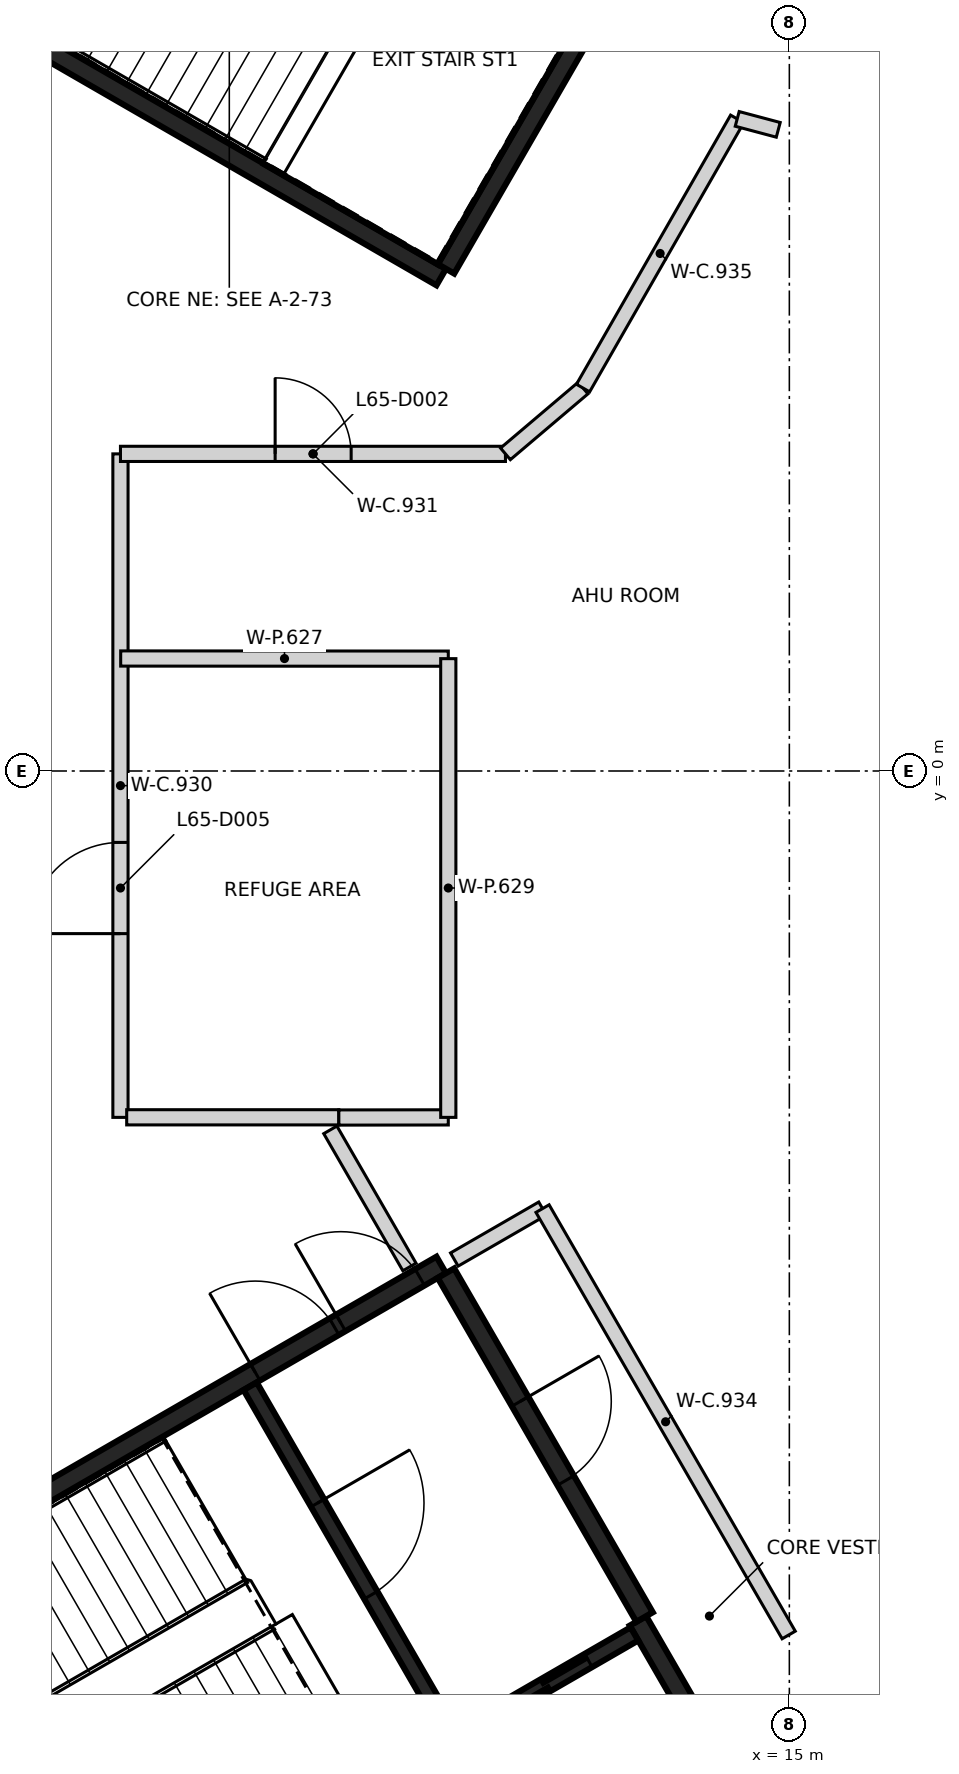
"""IFC4 building model, lengths in metres.
Left out: names, types, materials, properties, quantities, classifications, styles, units other than length and angle.
Written with IfcOpenShell. Run it as: python <this file> out.ifc"""

import sys

from ifc_helpers import new_model, si_unit, direction, frame, frame_2d, origin, place, context, subcontext, project, spatial, rectangle, extrude, element, fill, save


model = new_model("IFC4")
c1 = context("Model", 3, precision=1e-05, world=origin(), true_north=direction((0.0, 1.0)))
c2 = subcontext(c1, "Body", "Model", "MODEL_VIEW")
j1 = project(units=[si_unit("LENGTHUNIT", "METRE"), si_unit("PLANEANGLEUNIT", "RADIAN")], contexts=[c1])
p1 = place(None, origin())
s1 = spatial("IfcSite", under=j1, at=p1, CompositionType="ELEMENT")
p2 = place(p1, origin())
s2 = spatial("IfcBuilding", under=s1, at=p2, CompositionType="ELEMENT")
p3 = place(p2, frame((0.0, 0.0, 257.4)))
s3 = spatial("IfcBuildingStorey", under=s2, at=p3, CompositionType="ELEMENT", Elevation=257.4)
p4 = place(p3, frame((10.42, 6.498, 0.0), z_axis=(0.0, 0.0, 1.0), x_axis=(-0.866021906294, 0.500006057782, 0.0)))
e1 = element("IfcWall", 1, at=p4, inside=s3, PredefinedType="SHEAR", context=c2, shape_type="SweptSolid", body=[
    extrude(rectangle(XDim=11.55, YDim=0.25, at=frame_2d((5.775, 0.0))), origin(), (0.0, 0.0, 1.0), 4.45),
])
p5 = place(p4, frame((10.025, 0.0, 0.0)))
e2 = element("IfcOpeningElement", 2, at=p5, cuts=e1, PredefinedType="OPENING", context=c2, shape_type="SweptSolid", body=[
    extrude(rectangle(XDim=1.2, YDim=2.1, at=frame_2d((0.6, 1.05))), frame((0.0, 0.135, 0.0), z_axis=(0.0, -1.0, 0.0), x_axis=(1.0, 0.0, 0.0)), (0.0, 0.0, 1.0), 0.27),
])
p6 = place(p4, frame((8.725, 0.0, 0.0)))
e3 = element("IfcOpeningElement", 3, at=p6, cuts=e1, PredefinedType="OPENING", context=c2, shape_type="SweptSolid", body=[
    extrude(rectangle(XDim=1.2, YDim=2.1, at=frame_2d((0.6, 1.05))), frame((0.0, 0.135, 0.0), z_axis=(0.0, -1.0, 0.0), x_axis=(1.0, 0.0, 0.0)), (0.0, 0.0, 1.0), 0.27),
])
p7 = place(p3, frame((13.238, 11.378, 0.0), z_axis=(0.0, 0.0, 1.0), x_axis=(-0.500008851346, -0.866020293397, 0.0)))
e4 = element("IfcWall", 4, at=p7, inside=s3, PredefinedType="SHEAR", context=c2, shape_type="SweptSolid", body=[
    extrude(rectangle(XDim=5.51, YDim=0.25, at=frame_2d((2.755, 0.0))), origin(), (0.0, 0.0, 1.0), 4.45),
])
p8 = place(p3, frame((0.417, -12.273, 0.0), z_axis=(0.0, 0.0, 1.0), x_axis=(0.866021906294, 0.500006057782, 0.0)))
e5 = element("IfcWall", 5, at=p8, inside=s3, PredefinedType="SHEAR", context=c2, shape_type="SweptSolid", body=[
    extrude(rectangle(XDim=11.55, YDim=0.25, at=frame_2d((5.775, 0.0))), origin(), (0.0, 0.0, 1.0), 4.45),
])
p9 = place(p8, frame((10.025, 0.0, 0.0)))
e6 = element("IfcOpeningElement", 6, at=p9, cuts=e5, PredefinedType="OPENING", context=c2, shape_type="SweptSolid", body=[
    extrude(rectangle(XDim=1.2, YDim=2.1, at=frame_2d((0.6, 1.05))), frame((0.0, 0.135, 0.0), z_axis=(0.0, -1.0, 0.0), x_axis=(1.0, 0.0, 0.0)), (0.0, 0.0, 1.0), 0.27),
])
p10 = place(p8, frame((8.725, 0.0, 0.0)))
e7 = element("IfcOpeningElement", 7, at=p10, cuts=e5, PredefinedType="OPENING", context=c2, shape_type="SweptSolid", body=[
    extrude(rectangle(XDim=1.2, YDim=2.1, at=frame_2d((0.6, 1.05))), frame((0.0, 0.135, 0.0), z_axis=(0.0, -1.0, 0.0), x_axis=(1.0, 0.0, 0.0)), (0.0, 0.0, 1.0), 0.27),
])
p11 = place(p3, frame((13.008, -11.181, 0.0), z_axis=(0.0, 0.0, 1.0), x_axis=(0.500001955336, -0.866024274868, 0.0)))
e8 = element("IfcWall", 8, at=p11, inside=s3, PredefinedType="SHEAR", context=c2, shape_type="SweptSolid", body=[
    extrude(rectangle(XDim=6.125, YDim=0.25, at=frame_2d((3.062, 0.0))), origin(), (0.0, 0.0, 1.0), 4.45),
])
p12 = place(p11, frame((3.563, 0.0, 0.0)))
e9 = element("IfcOpeningElement", 9, at=p12, cuts=e8, PredefinedType="OPENING", context=c2, shape_type="SweptSolid", body=[
    extrude(rectangle(XDim=1.0, YDim=2.1, at=frame_2d((0.5, 1.05))), frame((0.0, 0.135, 0.0), z_axis=(0.0, -1.0, 0.0), x_axis=(1.0, 0.0, 0.0)), (0.0, 0.0, 1.0), 0.27),
])
p13 = place(p3, frame((10.483, -6.606, 0.0), z_axis=(0.0, 0.0, 1.0), x_axis=(0.49999885962, -0.866026062182, 0.0)))
e10 = element("IfcWall", 10, at=p13, inside=s3, PredefinedType="SHEAR", context=c2, shape_type="SweptSolid", body=[
    extrude(rectangle(XDim=5.225, YDim=0.25, at=frame_2d((2.612, 0.0))), origin(), (0.0, 0.0, 1.0), 4.45),
])
p14 = place(p13, frame((1.95, 0.0, 0.0)))
e11 = element("IfcOpeningElement", 11, at=p14, cuts=e10, PredefinedType="OPENING", context=c2, shape_type="SweptSolid", body=[
    extrude(rectangle(XDim=1.2, YDim=2.1, at=frame_2d((0.6, 1.05))), frame((0.0, 0.135, 0.0), z_axis=(0.0, -1.0, 0.0), x_axis=(1.0, 0.0, 0.0)), (0.0, 0.0, 1.0), 0.27),
])
p15 = place(p3, frame((7.906, -8.094, 0.0), z_axis=(0.0, 0.0, 1.0), x_axis=(0.500027839223, -0.866009330205, 0.0)))
e12 = element("IfcWall", 12, at=p15, inside=s3, PredefinedType="SHEAR", context=c2, shape_type="SweptSolid", body=[
    extrude(rectangle(XDim=5.098, YDim=0.2, at=frame_2d((2.549, 0.0))), origin(), (0.0, 0.0, 1.0), 4.45),
])
p16 = place(p15, frame((1.774, 0.0, 0.0)))
e13 = element("IfcOpeningElement", 13, at=p16, cuts=e12, PredefinedType="OPENING", context=c2, shape_type="SweptSolid", body=[
    extrude(rectangle(XDim=1.4, YDim=2.1, at=frame_2d((0.7, 1.05))), frame((0.0, 0.11, 0.0), z_axis=(0.0, -1.0, 0.0), x_axis=(1.0, 0.0, 0.0)), (0.0, 0.0, 1.0), 0.22),
])
p17 = place(p3, frame((10.666, -12.678, 0.0), z_axis=(0.0, 0.0, 1.0), x_axis=(0.866018407898, 0.500012117035, 0.0)))
e14 = element("IfcWall", 14, at=p17, inside=s3, PredefinedType="SHEAR", context=c2, shape_type="SweptSolid", body=[
    extrude(rectangle(XDim=2.651, YDim=0.2, at=frame_2d((1.325, 0.0))), origin(), (0.0, 0.0, 1.0), 4.45),
])
p18 = place(p17, frame((0.652, 0.0, 0.0)))
e15 = element("IfcOpeningElement", 15, at=p18, cuts=e14, PredefinedType="OPENING", context=c2, shape_type="SweptSolid", body=[
    extrude(rectangle(XDim=1.3, YDim=2.1, at=frame_2d((0.65, 1.05))), frame((0.0, 0.11, 0.0), z_axis=(0.0, -1.0, 0.0), x_axis=(1.0, 0.0, 0.0)), (0.0, 0.0, 1.0), 0.22),
])
p19 = place(p3, frame((6.2, -4.557, 0.0), z_axis=(0.0, 0.0, 1.0), x_axis=(0.0, 1.0, 0.0)))
e16 = element("IfcWall", 16, at=p19, inside=s3, PredefinedType="PARTITIONING", context=c2, shape_type="SweptSolid", body=[
    extrude(rectangle(XDim=8.729, YDim=0.2, at=frame_2d((4.365, 0.0))), origin(), (0.0, 0.0, 1.0), 4.45),
])
p20 = place(p19, frame((2.417, 0.0, 0.0)))
e17 = element("IfcOpeningElement", 17, at=p20, cuts=e16, PredefinedType="OPENING", context=c2, shape_type="SweptSolid", body=[
    extrude(rectangle(XDim=1.2, YDim=2.1, at=frame_2d((0.6, 1.05))), frame((0.0, 0.11, 0.0), z_axis=(0.0, -1.0, 0.0), x_axis=(1.0, 0.0, 0.0)), (0.0, 0.0, 1.0), 0.22),
])
p21 = place(p3, frame((6.2, 4.172, 0.0), z_axis=(0.0, 0.0, 1.0), x_axis=(1.0, 0.0, 0.0)))
e18 = element("IfcWall", 18, at=p21, inside=s3, PredefinedType="PARTITIONING", context=c2, shape_type="SweptSolid", body=[
    extrude(rectangle(XDim=5.065, YDim=0.2, at=frame_2d((2.532, 0.0))), origin(), (0.0, 0.0, 1.0), 4.45),
])
p22 = place(p21, frame((2.035, 0.0, 0.0)))
e19 = element("IfcOpeningElement", 19, at=p22, cuts=e18, PredefinedType="OPENING", context=c2, shape_type="SweptSolid", body=[
    extrude(rectangle(XDim=1.0, YDim=2.1, at=frame_2d((0.5, 1.05))), frame((0.0, 0.11, 0.0), z_axis=(0.0, -1.0, 0.0), x_axis=(1.0, 0.0, 0.0)), (0.0, 0.0, 1.0), 0.22),
])
p23 = place(p3, frame((6.282, -4.556, 0.0), z_axis=(0.0, 0.0, 1.0), x_axis=(1.0, 0.0, 0.0)))
e20 = element("IfcWall", 20, at=p23, inside=s3, PredefinedType="PARTITIONING", context=c2, shape_type="SweptSolid", body=[
    extrude(rectangle(XDim=2.791, YDim=0.2, at=frame_2d((1.396, 0.0))), origin(), (0.0, 0.0, 1.0), 4.45),
])
p24 = place(p3, frame((8.961, -4.721, 0.0), z_axis=(0.0, 0.0, 1.0), x_axis=(0.499806992981, -0.866136807766, 0.0)))
e21 = element("IfcWall", 21, at=p24, inside=s3, PredefinedType="PARTITIONING", context=c2, shape_type="SweptSolid", body=[
    extrude(rectangle(XDim=2.083, YDim=0.2, at=frame_2d((1.042, 0.0))), origin(), (0.0, 0.0, 1.0), 4.45),
])
p25 = place(p3, frame((10.593, -6.427, 0.0), z_axis=(0.0, 0.0, 1.0), x_axis=(0.865912429188, 0.500195626709, 0.0)))
e22 = element("IfcWall", 22, at=p25, inside=s3, PredefinedType="PARTITIONING", context=c2, shape_type="SweptSolid", body=[
    extrude(rectangle(XDim=1.34, YDim=0.2, at=frame_2d((0.67, 0.0))), origin(), (0.0, 0.0, 1.0), 4.45),
])
p26 = place(p3, frame((11.265, 4.172, 0.0), z_axis=(0.0, 0.0, 1.0), x_axis=(0.762631798807, 0.64683285279, 0.0)))
e23 = element("IfcWall", 23, at=p26, inside=s3, PredefinedType="PARTITIONING", context=c2, shape_type="SweptSolid", body=[
    extrude(rectangle(XDim=1.339, YDim=0.2, at=frame_2d((0.669, 0.0))), origin(), (0.0, 0.0, 1.0), 4.45),
])
p27 = place(p3, frame((11.753, -5.757, 0.0), z_axis=(0.0, 0.0, 1.0), x_axis=(0.499994352157, -0.866028664543, 0.0)))
e24 = element("IfcWall", 24, at=p27, inside=s3, PredefinedType="PARTITIONING", context=c2, shape_type="SweptSolid", body=[
    extrude(rectangle(XDim=6.477, YDim=0.2, at=frame_2d((3.239, 0.0))), origin(), (0.0, 0.0, 1.0), 4.45),
])
p28 = place(p3, frame((12.286, 5.038, 0.0), z_axis=(0.0, 0.0, 1.0), x_axis=(0.496995625394, 0.86775304571, 0.0)))
e25 = element("IfcWall", 25, at=p28, inside=s3, PredefinedType="PARTITIONING", context=c2, shape_type="SweptSolid", body=[
    extrude(rectangle(XDim=4.081, YDim=0.2, at=frame_2d((2.04, 0.0))), origin(), (0.0, 0.0, 1.0), 4.45),
])
p29 = place(p3, frame((14.314, 8.579, 0.0), z_axis=(0.0, 0.0, 1.0), x_axis=(0.966220438204, -0.257717024656, 0.0)))
e26 = element("IfcWall", 26, at=p29, inside=s3, PredefinedType="PARTITIONING", context=c2, shape_type="SweptSolid", body=[
    extrude(rectangle(XDim=0.559, YDim=0.2, at=frame_2d((0.279, 0.0))), origin(), (0.0, 0.0, 1.0), 4.45),
])
p30 = place(p3, frame((6.203, 1.48, 0.0), z_axis=(0.0, 0.0, 1.0), x_axis=(0.999999897325, -0.000453155046, 0.0)))
e27 = element("IfcWall", 27, at=p30, inside=s3, PredefinedType="PARTITIONING", context=c2, shape_type="SweptSolid", body=[
    extrude(rectangle(XDim=4.31, YDim=0.2, at=frame_2d((2.155, 0.0))), origin(), (0.0, 0.0, 1.0), 4.45),
])
p31 = place(p3, frame((9.073, -4.559, 0.0), z_axis=(0.0, 0.0, 1.0), x_axis=(0.999999080102, 0.00135639075, 0.0)))
e28 = element("IfcWall", 28, at=p31, inside=s3, PredefinedType="PARTITIONING", context=c2, shape_type="SweptSolid", body=[
    extrude(rectangle(XDim=1.44, YDim=0.2, at=frame_2d((0.72, 0.0))), origin(), (0.0, 0.0, 1.0), 4.45),
])
p32 = place(p3, frame((10.513, -4.557, 0.0), z_axis=(0.0, 0.0, 1.0), x_axis=(0.0, 1.0, 0.0)))
e29 = element("IfcWall", 29, at=p32, inside=s3, PredefinedType="PARTITIONING", context=c2, shape_type="SweptSolid", body=[
    extrude(rectangle(XDim=6.035, YDim=0.2, at=frame_2d((3.018, 0.0))), origin(), (0.0, 0.0, 1.0), 4.45),
])
p33 = place(p18, origin())
e30 = element("IfcDoor", 30, at=p33, inside=s3, OperationType="SLIDING_TO_LEFT", PredefinedType="DOOR", context=c2, shape_type="SweptSolid", body=[
    extrude(rectangle(XDim=1.3, YDim=2.1, at=frame_2d((0.65, 1.05))), frame((0.0, 0.025, 0.0), z_axis=(0.0, -1.0, 0.0), x_axis=(1.0, 0.0, 0.0)), (0.0, 0.0, 1.0), 0.05),
])
fill(e15, e30)
p34 = place(p9, origin())
e31 = element("IfcDoor", 31, at=p34, inside=s3, OperationType="SINGLE_SWING_LEFT", PredefinedType="DOOR", context=c2, shape_type="SweptSolid", body=[
    extrude(rectangle(XDim=1.2, YDim=2.1, at=frame_2d((0.6, 1.05))), frame((0.0, 0.025, 0.0), z_axis=(0.0, -1.0, 0.0), x_axis=(1.0, 0.0, 0.0)), (0.0, 0.0, 1.0), 0.05),
])
fill(e6, e31)
p35 = place(p10, origin())
e32 = element("IfcDoor", 32, at=p35, inside=s3, OperationType="SINGLE_SWING_RIGHT", PredefinedType="DOOR", context=c2, shape_type="SweptSolid", body=[
    extrude(rectangle(XDim=1.2, YDim=2.1, at=frame_2d((0.6, 1.05))), frame((0.0, 0.025, 0.0), z_axis=(0.0, -1.0, 0.0), x_axis=(1.0, 0.0, 0.0)), (0.0, 0.0, 1.0), 0.05),
])
fill(e7, e32)
p36 = place(p16, origin())
e33 = element("IfcDoor", 33, at=p36, inside=s3, OperationType="SINGLE_SWING_LEFT", PredefinedType="DOOR", context=c2, shape_type="SweptSolid", body=[
    extrude(rectangle(XDim=1.4, YDim=2.1, at=frame_2d((0.7, 1.05))), frame((0.0, 0.025, 0.0), z_axis=(0.0, -1.0, 0.0), x_axis=(1.0, 0.0, 0.0)), (0.0, 0.0, 1.0), 0.05),
])
fill(e13, e33)
p37 = place(p14, origin())
e34 = element("IfcDoor", 34, at=p37, inside=s3, OperationType="SINGLE_SWING_RIGHT", PredefinedType="DOOR", context=c2, shape_type="SweptSolid", body=[
    extrude(rectangle(XDim=1.2, YDim=2.1, at=frame_2d((0.6, 1.05))), frame((0.0, 0.025, 0.0), z_axis=(0.0, -1.0, 0.0), x_axis=(1.0, 0.0, 0.0)), (0.0, 0.0, 1.0), 0.05),
])
fill(e11, e34)
p38 = place(p22, frame((1.0, 0.0, 0.0), z_axis=(0.0, 0.0, 1.0), x_axis=(-1.0, 0.0, 0.0)))
e35 = element("IfcDoor", 35, at=p38, inside=s3, OperationType="SINGLE_SWING_LEFT", PredefinedType="DOOR", context=c2, shape_type="SweptSolid", body=[
    extrude(rectangle(XDim=1.0, YDim=2.1, at=frame_2d((0.5, 1.05))), frame((0.0, 0.025, 0.0), z_axis=(0.0, -1.0, 0.0), x_axis=(1.0, 0.0, 0.0)), (0.0, 0.0, 1.0), 0.05),
])
fill(e19, e35)
p39 = place(p20, frame((1.2, 0.0, 0.0), z_axis=(0.0, 0.0, 1.0), x_axis=(-1.0, 0.0, 0.0)))
e36 = element("IfcDoor", 36, at=p39, inside=s3, OperationType="SINGLE_SWING_LEFT", PredefinedType="DOOR", context=c2, shape_type="SweptSolid", body=[
    extrude(rectangle(XDim=1.2, YDim=2.1, at=frame_2d((0.6, 1.05))), frame((0.0, 0.025, 0.0), z_axis=(0.0, -1.0, 0.0), x_axis=(1.0, 0.0, 0.0)), (0.0, 0.0, 1.0), 0.05),
])
fill(e17, e36)
save(model, sys.argv[1])
